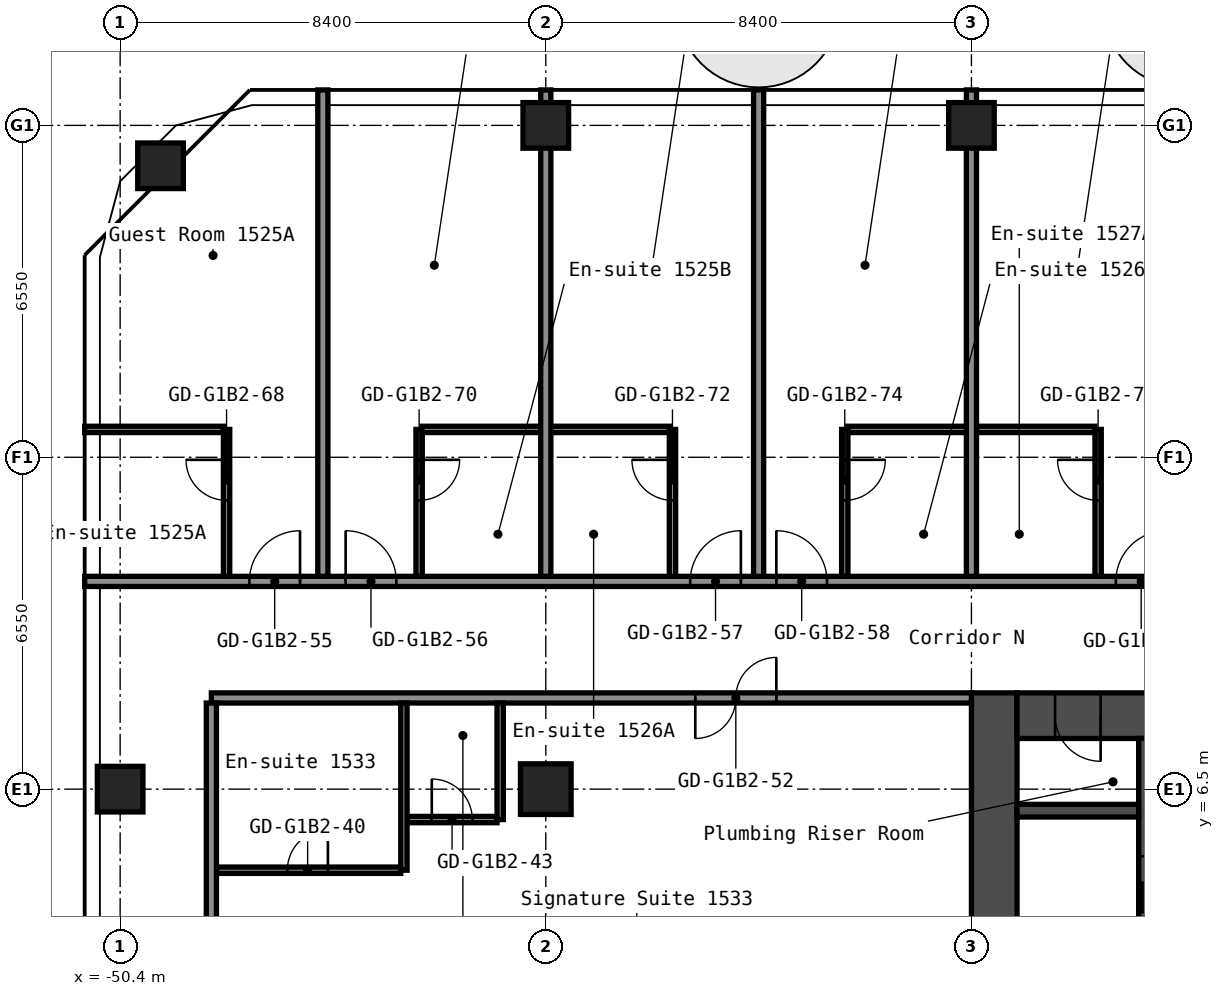
"""IFC4 building model, lengths in metres.
Left out: names, types, materials, properties, quantities, classifications, styles, units other than length and angle.
Written with IfcOpenShell. Run it as: python <this file> out.ifc"""

import sys

from ifc_helpers import new_model, si_unit, direction, frame, frame_2d, origin, origin_2d, place, context, subcontext, project, spatial, rectangle, hollow_rectangle, extrude, element, fill, save


model = new_model("IFC4")
c1 = context("Model", 3, precision=1e-05, world=origin(), true_north=direction((0.0, 1.0)))
c2 = subcontext(c1, "Body", "Model", "MODEL_VIEW")
j1 = project(units=[si_unit("LENGTHUNIT", "METRE"), si_unit("PLANEANGLEUNIT", "RADIAN")], contexts=[c1])
p1 = place(None, origin())
s1 = spatial("IfcSite", under=j1, at=p1, CompositionType="ELEMENT")
p2 = place(p1, origin())
s2 = spatial("IfcBuilding", under=s1, at=p2, CompositionType="ELEMENT")
p3 = place(p2, frame((0.0, 0.0, 55.0)))
s3 = spatial("IfcBuildingStorey", under=s2, at=p3, CompositionType="ELEMENT", Elevation=55.0)
for number, where, z_axis, x_axis in (
    (1, (-50.4, 6.5, 0.0), (0.0, 0.0, 1.0), (1.0, 0.0, 0.0)),
    (2, (-49.603, 18.803, 0.0), (0.0, 0.0, 1.0), (1.0, 0.0, 0.0)),
):
    element("IfcColumn", number, at=place(p3, frame(where, z_axis=z_axis, x_axis=x_axis)), inside=s3, PredefinedType="COLUMN", context=c2, shape_type="SweptSolid", body=[
        extrude(hollow_rectangle(XDim=0.9, YDim=0.9, WallThickness=0.036, at=origin_2d()), origin(), (0.0, 0.0, 1.0), 2.8),
    ])
p4 = place(p3, frame((-42.0, 6.5, 0.0), z_axis=(0.0, 0.0, 1.0), x_axis=(1.0, 0.0, 0.0)))
e3 = element("IfcColumn", 3, at=p4, inside=s3, PredefinedType="COLUMN", context=c2, shape_type="SweptSolid", body=[
    extrude(hollow_rectangle(XDim=1.0, YDim=1.0, WallThickness=0.04, at=origin_2d()), origin(), (0.0, 0.0, 1.0), 2.8),
])
for number, where, z_axis, x_axis in (
    (4, (-42.0, 19.6, 0.0), (0.0, 0.0, 1.0), (1.0, 0.0, 0.0)),
    (5, (-33.6, 19.6, 0.0), (0.0, 0.0, 1.0), (1.0, 0.0, 0.0)),
):
    element("IfcColumn", number, at=place(p3, frame(where, z_axis=z_axis, x_axis=x_axis)), inside=s3, PredefinedType="COLUMN", context=c2, shape_type="SweptSolid", body=[
        extrude(hollow_rectangle(XDim=0.9, YDim=0.9, WallThickness=0.036, at=origin_2d()), origin(), (0.0, 0.0, 1.0), 2.8),
    ])
p5 = place(p3, frame((-33.15, -8.4, 0.0), z_axis=(0.0, 0.0, 1.0), x_axis=(0.0, 1.0, 0.0)))
e6 = element("IfcWall", 6, at=p5, inside=s3, PredefinedType="SHEAR", context=c2, shape_type="SweptSolid", body=[
    extrude(rectangle(XDim=16.8, YDim=0.9, at=frame_2d((8.4, 0.0))), origin(), (0.0, 0.0, 1.0), 2.8),
])
p6 = place(p3, frame((-32.7, 7.95, 0.0), z_axis=(0.0, 0.0, 1.0), x_axis=(1.0, 0.0, 0.0)))
e7 = element("IfcWall", 7, at=p6, inside=s3, PredefinedType="SHEAR", context=c2, shape_type="SweptSolid", body=[
    extrude(rectangle(XDim=15.0, YDim=0.9, at=frame_2d((7.5, 0.0))), origin(), (0.0, 0.0, 1.0), 2.8),
])
p7 = place(p6, frame((3.4, 0.0, 0.0)))
e8 = element("IfcOpeningElement", 8, at=p7, cuts=e7, PredefinedType="OPENING", context=c2, shape_type="SweptSolid", body=[
    extrude(rectangle(XDim=1.2, YDim=2.1, at=frame_2d((0.6, 1.05))), frame((0.0, 0.46, 0.0), z_axis=(0.0, -1.0, 0.0), x_axis=(1.0, 0.0, 0.0)), (0.0, 0.0, 1.0), 0.92),
])
p8 = place(p6, frame((0.75, 0.0, 0.0)))
e9 = element("IfcOpeningElement", 9, at=p8, cuts=e7, PredefinedType="OPENING", context=c2, shape_type="SweptSolid", body=[
    extrude(rectangle(XDim=0.9, YDim=2.1, at=frame_2d((0.45, 1.05))), frame((0.0, 0.46, 0.0), z_axis=(0.0, -1.0, 0.0), x_axis=(1.0, 0.0, 0.0)), (0.0, 0.0, 1.0), 0.92),
])
p9 = place(p3, frame((-30.175, 1.45, 0.0), z_axis=(0.0, 0.0, 1.0), x_axis=(0.0, 1.0, 0.0)))
e10 = element("IfcWall", 10, at=p9, inside=s3, PredefinedType="SHEAR", context=c2, shape_type="SweptSolid", body=[
    extrude(rectangle(XDim=6.05, YDim=0.25, at=frame_2d((3.025, 0.0))), origin(), (0.0, 0.0, 1.0), 2.8),
])
p10 = place(p9, frame((2.625, 0.0, 0.0)))
e11 = element("IfcOpeningElement", 11, at=p10, cuts=e10, PredefinedType="OPENING", context=c2, shape_type="SweptSolid", body=[
    extrude(rectangle(XDim=1.1, YDim=2.1, at=frame_2d((0.55, 1.05))), frame((0.0, 0.135, 0.0), z_axis=(0.0, -1.0, 0.0), x_axis=(1.0, 0.0, 0.0)), (0.0, 0.0, 1.0), 0.27),
])
p11 = place(p3, frame((-32.7, 6.075, 0.0), z_axis=(0.0, 0.0, 1.0), x_axis=(1.0, 0.0, 0.0)))
e12 = element("IfcWall", 12, at=p11, inside=s3, PredefinedType="SHEAR", context=c2, shape_type="SweptSolid", body=[
    extrude(rectangle(XDim=2.4, YDim=0.25, at=frame_2d((1.2, 0.0))), origin(), (0.0, 0.0, 1.0), 2.8),
])
p12 = place(p3, frame((-48.5, 4.9, 0.0), z_axis=(0.0, 0.0, 1.0), x_axis=(1.0, 0.0, 0.0)))
e13 = element("IfcWall", 13, at=p12, inside=s3, PredefinedType="PARTITIONING", context=c2, shape_type="SweptSolid", body=[
    extrude(rectangle(XDim=3.637, YDim=0.125, at=frame_2d((1.819, 0.0))), origin(), (0.0, 0.0, 1.0), 2.8),
])
p13 = place(p12, frame((1.4, 0.0, 0.0)))
e14 = element("IfcOpeningElement", 14, at=p13, cuts=e13, PredefinedType="OPENING", context=c2, shape_type="SweptSolid", body=[
    extrude(rectangle(XDim=0.8, YDim=2.1, at=frame_2d((0.4, 1.05))), frame((0.0, 0.073, 0.0), z_axis=(0.0, -1.0, 0.0), x_axis=(1.0, 0.0, 0.0)), (0.0, 0.0, 1.0), 0.145),
])
p14 = place(p3, frame((-44.738, 5.9, 0.0), z_axis=(0.0, 0.0, 1.0), x_axis=(1.0, 0.0, 0.0)))
e15 = element("IfcWall", 15, at=p14, inside=s3, PredefinedType="PARTITIONING", context=c2, shape_type="SweptSolid", body=[
    extrude(rectangle(XDim=1.775, YDim=0.125, at=frame_2d((0.888, 0.0))), origin(), (0.0, 0.0, 1.0), 2.8),
])
p15 = place(p14, frame((0.488, 0.0, 0.0)))
e16 = element("IfcOpeningElement", 16, at=p15, cuts=e15, PredefinedType="OPENING", context=c2, shape_type="SweptSolid", body=[
    extrude(rectangle(XDim=0.8, YDim=2.1, at=frame_2d((0.4, 1.05))), frame((0.0, 0.073, 0.0), z_axis=(0.0, -1.0, 0.0), x_axis=(1.0, 0.0, 0.0)), (0.0, 0.0, 1.0), 0.145),
])
p16 = place(p3, frame((-48.6, 8.3, 0.0), z_axis=(0.0, 0.0, 1.0), x_axis=(1.0, 0.0, 0.0)))
e17 = element("IfcWall", 17, at=p16, inside=s3, PredefinedType="PARTITIONING", context=c2, shape_type="SweptSolid", body=[
    extrude(rectangle(XDim=15.0, YDim=0.2, at=frame_2d((7.5, 0.0))), origin(), (0.0, 0.0, 1.0), 2.8),
])
p17 = place(p16, frame((9.55, 0.0, 0.0)))
e18 = element("IfcOpeningElement", 18, at=p17, cuts=e17, PredefinedType="OPENING", context=c2, shape_type="SweptSolid", body=[
    extrude(rectangle(XDim=1.6, YDim=2.1, at=frame_2d((0.8, 1.05))), frame((0.0, 0.11, 0.0), z_axis=(0.0, -1.0, 0.0), x_axis=(1.0, 0.0, 0.0)), (0.0, 0.0, 1.0), 0.22),
])
p18 = place(p3, frame((-51.1, 10.6, 0.0), z_axis=(0.0, 0.0, 1.0), x_axis=(1.0, 0.0, 0.0)))
e19 = element("IfcWall", 19, at=p18, inside=s3, PredefinedType="PARTITIONING", context=c2, shape_type="SweptSolid", body=[
    extrude(rectangle(XDim=34.3, YDim=0.2, at=frame_2d((17.15, 0.0))), origin(), (0.0, 0.0, 1.0), 2.8),
])
p19 = place(p18, frame((3.25, 0.0, 0.0)))
e20 = element("IfcOpeningElement", 20, at=p19, cuts=e19, PredefinedType="OPENING", context=c2, shape_type="SweptSolid", body=[
    extrude(rectangle(XDim=1.0, YDim=2.1, at=frame_2d((0.5, 1.05))), frame((0.0, 0.11, 0.0), z_axis=(0.0, -1.0, 0.0), x_axis=(1.0, 0.0, 0.0)), (0.0, 0.0, 1.0), 0.22),
])
p20 = place(p18, frame((5.15, 0.0, 0.0)))
e21 = element("IfcOpeningElement", 21, at=p20, cuts=e19, PredefinedType="OPENING", context=c2, shape_type="SweptSolid", body=[
    extrude(rectangle(XDim=1.0, YDim=2.1, at=frame_2d((0.5, 1.05))), frame((0.0, 0.11, 0.0), z_axis=(0.0, -1.0, 0.0), x_axis=(1.0, 0.0, 0.0)), (0.0, 0.0, 1.0), 0.22),
])
p21 = place(p18, frame((11.95, 0.0, 0.0)))
e22 = element("IfcOpeningElement", 22, at=p21, cuts=e19, PredefinedType="OPENING", context=c2, shape_type="SweptSolid", body=[
    extrude(rectangle(XDim=1.0, YDim=2.1, at=frame_2d((0.5, 1.05))), frame((0.0, 0.11, 0.0), z_axis=(0.0, -1.0, 0.0), x_axis=(1.0, 0.0, 0.0)), (0.0, 0.0, 1.0), 0.22),
])
p22 = place(p18, frame((13.65, 0.0, 0.0)))
e23 = element("IfcOpeningElement", 23, at=p22, cuts=e19, PredefinedType="OPENING", context=c2, shape_type="SweptSolid", body=[
    extrude(rectangle(XDim=1.0, YDim=2.1, at=frame_2d((0.5, 1.05))), frame((0.0, 0.11, 0.0), z_axis=(0.0, -1.0, 0.0), x_axis=(1.0, 0.0, 0.0)), (0.0, 0.0, 1.0), 0.22),
])
p23 = place(p18, frame((20.35, 0.0, 0.0)))
e24 = element("IfcOpeningElement", 24, at=p23, cuts=e19, PredefinedType="OPENING", context=c2, shape_type="SweptSolid", body=[
    extrude(rectangle(XDim=1.0, YDim=2.1, at=frame_2d((0.5, 1.05))), frame((0.0, 0.11, 0.0), z_axis=(0.0, -1.0, 0.0), x_axis=(1.0, 0.0, 0.0)), (0.0, 0.0, 1.0), 0.22),
])
p24 = place(p18, frame((22.05, 0.0, 0.0)))
e25 = element("IfcOpeningElement", 25, at=p24, cuts=e19, PredefinedType="OPENING", context=c2, shape_type="SweptSolid", body=[
    extrude(rectangle(XDim=1.0, YDim=2.1, at=frame_2d((0.5, 1.05))), frame((0.0, 0.11, 0.0), z_axis=(0.0, -1.0, 0.0), x_axis=(1.0, 0.0, 0.0)), (0.0, 0.0, 1.0), 0.22),
])
p25 = place(p18, frame((28.75, 0.0, 0.0)))
e26 = element("IfcOpeningElement", 26, at=p25, cuts=e19, PredefinedType="OPENING", context=c2, shape_type="SweptSolid", body=[
    extrude(rectangle(XDim=1.0, YDim=2.1, at=frame_2d((0.5, 1.05))), frame((0.0, 0.11, 0.0), z_axis=(0.0, -1.0, 0.0), x_axis=(1.0, 0.0, 0.0)), (0.0, 0.0, 1.0), 0.22),
])
p26 = place(p18, frame((30.45, 0.0, 0.0)))
e27 = element("IfcOpeningElement", 27, at=p26, cuts=e19, PredefinedType="OPENING", context=c2, shape_type="SweptSolid", body=[
    extrude(rectangle(XDim=1.0, YDim=2.1, at=frame_2d((0.5, 1.05))), frame((0.0, 0.11, 0.0), z_axis=(0.0, -1.0, 0.0), x_axis=(1.0, 0.0, 0.0)), (0.0, 0.0, 1.0), 0.22),
])
p27 = place(p3, frame((-51.1, 13.6, 0.0), z_axis=(0.0, 0.0, 1.0), x_axis=(1.0, 0.0, 0.0)))
e28 = element("IfcWall", 28, at=p27, inside=s3, PredefinedType="PARTITIONING", context=c2, shape_type="SweptSolid", body=[
    extrude(rectangle(XDim=2.738, YDim=0.125, at=frame_2d((1.369, 0.0))), origin(), (0.0, 0.0, 1.0), 2.8),
])
for number, where, z_axis, x_axis in (
    (29, (-44.438, 13.6, 0.0), (0.0, 0.0, 1.0), (1.0, 0.0, 0.0)),
    (30, (-36.038, 13.6, 0.0), (0.0, 0.0, 1.0), (1.0, 0.0, 0.0)),
):
    element("IfcWall", number, at=place(p3, frame(where, z_axis=z_axis, x_axis=x_axis)), inside=s3, PredefinedType="PARTITIONING", context=c2, shape_type="SweptSolid", body=[
        extrude(rectangle(XDim=4.875, YDim=0.125, at=frame_2d((2.438, 0.0))), origin(), (0.0, 0.0, 1.0), 2.8),
    ])
p28 = place(p3, frame((-48.6, -8.2, 0.0), z_axis=(0.0, 0.0, 1.0), x_axis=(0.0, 1.0, 0.0)))
e31 = element("IfcWall", 31, at=p28, inside=s3, PredefinedType="PARTITIONING", context=c2, shape_type="SweptSolid", body=[
    extrude(rectangle(XDim=16.4, YDim=0.2, at=frame_2d((8.2, 0.0))), origin(), (0.0, 0.0, 1.0), 2.8),
])
p29 = place(p3, frame((-48.3, 10.7, 0.0), z_axis=(0.0, 0.0, 1.0), x_axis=(0.0, 1.0, 0.0)))
e32 = element("IfcWall", 32, at=p29, inside=s3, PredefinedType="PARTITIONING", context=c2, shape_type="SweptSolid", body=[
    extrude(rectangle(XDim=2.9, YDim=0.125, at=frame_2d((1.45, 0.0))), origin(), (0.0, 0.0, 1.0), 2.8),
])
p30 = place(p29, frame((1.5, 0.0, 0.0)))
e33 = element("IfcOpeningElement", 33, at=p30, cuts=e32, PredefinedType="OPENING", context=c2, shape_type="SweptSolid", body=[
    extrude(rectangle(XDim=0.8, YDim=2.1, at=frame_2d((0.4, 1.05))), frame((0.0, 0.073, 0.0), z_axis=(0.0, -1.0, 0.0), x_axis=(1.0, 0.0, 0.0)), (0.0, 0.0, 1.0), 0.145),
])
p31 = place(p3, frame((-46.4, 10.7, 0.0), z_axis=(0.0, 0.0, 1.0), x_axis=(0.0, 1.0, 0.0)))
e34 = element("IfcWall", 34, at=p31, inside=s3, PredefinedType="PARTITIONING", context=c2, shape_type="SweptSolid", body=[
    extrude(rectangle(XDim=9.6, YDim=0.2, at=frame_2d((4.8, 0.0))), origin(), (0.0, 0.0, 1.0), 2.8),
])
p32 = place(p3, frame((-44.8, 4.9, 0.0), z_axis=(0.0, 0.0, 1.0), x_axis=(0.0, 1.0, 0.0)))
e35 = element("IfcWall", 35, at=p32, inside=s3, PredefinedType="PARTITIONING", context=c2, shape_type="SweptSolid", body=[
    extrude(rectangle(XDim=3.3, YDim=0.125, at=frame_2d((1.65, 0.0))), origin(), (0.0, 0.0, 1.0), 2.8),
])
p33 = place(p3, frame((-44.5, 10.7, 0.0), z_axis=(0.0, 0.0, 1.0), x_axis=(0.0, 1.0, 0.0)))
e36 = element("IfcWall", 36, at=p33, inside=s3, PredefinedType="PARTITIONING", context=c2, shape_type="SweptSolid", body=[
    extrude(rectangle(XDim=2.9, YDim=0.125, at=frame_2d((1.45, 0.0))), origin(), (0.0, 0.0, 1.0), 2.8),
])
p34 = place(p33, frame((1.5, 0.0, 0.0)))
e37 = element("IfcOpeningElement", 37, at=p34, cuts=e36, PredefinedType="OPENING", context=c2, shape_type="SweptSolid", body=[
    extrude(rectangle(XDim=0.8, YDim=2.1, at=frame_2d((0.4, 1.05))), frame((0.0, 0.073, 0.0), z_axis=(0.0, -1.0, 0.0), x_axis=(1.0, 0.0, 0.0)), (0.0, 0.0, 1.0), 0.145),
])
p35 = place(p3, frame((-42.9, 5.9, 0.0), z_axis=(0.0, 0.0, 1.0), x_axis=(0.0, 1.0, 0.0)))
e38 = element("IfcWall", 38, at=p35, inside=s3, PredefinedType="PARTITIONING", context=c2, shape_type="SweptSolid", body=[
    extrude(rectangle(XDim=2.3, YDim=0.125, at=frame_2d((1.15, 0.0))), origin(), (0.0, 0.0, 1.0), 2.8),
])
p36 = place(p3, frame((-42.0, 10.7, 0.0), z_axis=(0.0, 0.0, 1.0), x_axis=(0.0, 1.0, 0.0)))
e39 = element("IfcWall", 39, at=p36, inside=s3, PredefinedType="PARTITIONING", context=c2, shape_type="SweptSolid", body=[
    extrude(rectangle(XDim=9.6, YDim=0.2, at=frame_2d((4.8, 0.0))), origin(), (0.0, 0.0, 1.0), 2.8),
])
p37 = place(p3, frame((-39.5, 10.7, 0.0), z_axis=(0.0, 0.0, 1.0), x_axis=(0.0, 1.0, 0.0)))
e40 = element("IfcWall", 40, at=p37, inside=s3, PredefinedType="PARTITIONING", context=c2, shape_type="SweptSolid", body=[
    extrude(rectangle(XDim=2.9, YDim=0.125, at=frame_2d((1.45, 0.0))), origin(), (0.0, 0.0, 1.0), 2.8),
])
p38 = place(p37, frame((1.5, 0.0, 0.0)))
e41 = element("IfcOpeningElement", 41, at=p38, cuts=e40, PredefinedType="OPENING", context=c2, shape_type="SweptSolid", body=[
    extrude(rectangle(XDim=0.8, YDim=2.1, at=frame_2d((0.4, 1.05))), frame((0.0, 0.073, 0.0), z_axis=(0.0, -1.0, 0.0), x_axis=(1.0, 0.0, 0.0)), (0.0, 0.0, 1.0), 0.145),
])
p39 = place(p3, frame((-37.8, 10.7, 0.0), z_axis=(0.0, 0.0, 1.0), x_axis=(0.0, 1.0, 0.0)))
e42 = element("IfcWall", 42, at=p39, inside=s3, PredefinedType="PARTITIONING", context=c2, shape_type="SweptSolid", body=[
    extrude(rectangle(XDim=9.6, YDim=0.2, at=frame_2d((4.8, 0.0))), origin(), (0.0, 0.0, 1.0), 2.8),
])
p40 = place(p3, frame((-36.1, 10.7, 0.0), z_axis=(0.0, 0.0, 1.0), x_axis=(0.0, 1.0, 0.0)))
e43 = element("IfcWall", 43, at=p40, inside=s3, PredefinedType="PARTITIONING", context=c2, shape_type="SweptSolid", body=[
    extrude(rectangle(XDim=2.9, YDim=0.125, at=frame_2d((1.45, 0.0))), origin(), (0.0, 0.0, 1.0), 2.8),
])
p41 = place(p40, frame((1.5, 0.0, 0.0)))
e44 = element("IfcOpeningElement", 44, at=p41, cuts=e43, PredefinedType="OPENING", context=c2, shape_type="SweptSolid", body=[
    extrude(rectangle(XDim=0.8, YDim=2.1, at=frame_2d((0.4, 1.05))), frame((0.0, 0.073, 0.0), z_axis=(0.0, -1.0, 0.0), x_axis=(1.0, 0.0, 0.0)), (0.0, 0.0, 1.0), 0.145),
])
p42 = place(p3, frame((-33.6, 10.7, 0.0), z_axis=(0.0, 0.0, 1.0), x_axis=(0.0, 1.0, 0.0)))
e45 = element("IfcWall", 45, at=p42, inside=s3, PredefinedType="PARTITIONING", context=c2, shape_type="SweptSolid", body=[
    extrude(rectangle(XDim=9.6, YDim=0.2, at=frame_2d((4.8, 0.0))), origin(), (0.0, 0.0, 1.0), 2.8),
])
p43 = place(p3, frame((-31.1, 10.7, 0.0), z_axis=(0.0, 0.0, 1.0), x_axis=(0.0, 1.0, 0.0)))
e46 = element("IfcWall", 46, at=p43, inside=s3, PredefinedType="PARTITIONING", context=c2, shape_type="SweptSolid", body=[
    extrude(rectangle(XDim=2.9, YDim=0.125, at=frame_2d((1.45, 0.0))), origin(), (0.0, 0.0, 1.0), 2.8),
])
p44 = place(p43, frame((1.5, 0.0, 0.0)))
e47 = element("IfcOpeningElement", 47, at=p44, cuts=e46, PredefinedType="OPENING", context=c2, shape_type="SweptSolid", body=[
    extrude(rectangle(XDim=0.8, YDim=2.1, at=frame_2d((0.4, 1.05))), frame((0.0, 0.073, 0.0), z_axis=(0.0, -1.0, 0.0), x_axis=(1.0, 0.0, 0.0)), (0.0, 0.0, 1.0), 0.145),
])
p45 = place(p8, origin())
e48 = element("IfcDoor", 48, at=p45, inside=s3, OperationType="SINGLE_SWING_RIGHT", PredefinedType="DOOR", context=c2, shape_type="SweptSolid", body=[
    extrude(rectangle(XDim=0.9, YDim=2.1, at=frame_2d((0.45, 1.05))), frame((0.0, 0.025, 0.0), z_axis=(0.0, -1.0, 0.0), x_axis=(1.0, 0.0, 0.0)), (0.0, 0.0, 1.0), 0.05),
])
fill(e9, e48)
p46 = place(p13, origin())
e49 = element("IfcDoor", 49, at=p46, inside=s3, OperationType="SINGLE_SWING_LEFT", PredefinedType="DOOR", context=c2, shape_type="SweptSolid", body=[
    extrude(rectangle(XDim=0.8, YDim=2.1, at=frame_2d((0.4, 1.05))), frame((0.0, 0.025, 0.0), z_axis=(0.0, -1.0, 0.0), x_axis=(1.0, 0.0, 0.0)), (0.0, 0.0, 1.0), 0.05),
])
fill(e14, e49)
p47 = place(p15, origin())
e50 = element("IfcDoor", 50, at=p47, inside=s3, OperationType="SINGLE_SWING_RIGHT", PredefinedType="DOOR", context=c2, shape_type="SweptSolid", body=[
    extrude(rectangle(XDim=0.8, YDim=2.1, at=frame_2d((0.4, 1.05))), frame((0.0, 0.025, 0.0), z_axis=(0.0, -1.0, 0.0), x_axis=(1.0, 0.0, 0.0)), (0.0, 0.0, 1.0), 0.05),
])
fill(e16, e50)
p48 = place(p17, origin())
e51 = element("IfcDoor", 51, at=p48, inside=s3, OperationType="DOUBLE_DOOR_SINGLE_SWING", PredefinedType="DOOR", context=c2, shape_type="SweptSolid", body=[
    extrude(rectangle(XDim=1.6, YDim=2.1, at=frame_2d((0.8, 1.05))), frame((0.0, 0.025, 0.0), z_axis=(0.0, -1.0, 0.0), x_axis=(1.0, 0.0, 0.0)), (0.0, 0.0, 1.0), 0.05),
])
fill(e18, e51)
p49 = place(p19, origin())
e52 = element("IfcDoor", 52, at=p49, inside=s3, OperationType="SINGLE_SWING_LEFT", PredefinedType="DOOR", context=c2, shape_type="SweptSolid", body=[
    extrude(rectangle(XDim=1.0, YDim=2.1, at=frame_2d((0.5, 1.05))), frame((0.0, 0.025, 0.0), z_axis=(0.0, -1.0, 0.0), x_axis=(1.0, 0.0, 0.0)), (0.0, 0.0, 1.0), 0.05),
])
fill(e20, e52)
p50 = place(p20, origin())
e53 = element("IfcDoor", 53, at=p50, inside=s3, OperationType="SINGLE_SWING_RIGHT", PredefinedType="DOOR", context=c2, shape_type="SweptSolid", body=[
    extrude(rectangle(XDim=1.0, YDim=2.1, at=frame_2d((0.5, 1.05))), frame((0.0, 0.025, 0.0), z_axis=(0.0, -1.0, 0.0), x_axis=(1.0, 0.0, 0.0)), (0.0, 0.0, 1.0), 0.05),
])
fill(e21, e53)
p51 = place(p21, origin())
e54 = element("IfcDoor", 54, at=p51, inside=s3, OperationType="SINGLE_SWING_LEFT", PredefinedType="DOOR", context=c2, shape_type="SweptSolid", body=[
    extrude(rectangle(XDim=1.0, YDim=2.1, at=frame_2d((0.5, 1.05))), frame((0.0, 0.025, 0.0), z_axis=(0.0, -1.0, 0.0), x_axis=(1.0, 0.0, 0.0)), (0.0, 0.0, 1.0), 0.05),
])
fill(e22, e54)
p52 = place(p22, origin())
e55 = element("IfcDoor", 55, at=p52, inside=s3, OperationType="SINGLE_SWING_RIGHT", PredefinedType="DOOR", context=c2, shape_type="SweptSolid", body=[
    extrude(rectangle(XDim=1.0, YDim=2.1, at=frame_2d((0.5, 1.05))), frame((0.0, 0.025, 0.0), z_axis=(0.0, -1.0, 0.0), x_axis=(1.0, 0.0, 0.0)), (0.0, 0.0, 1.0), 0.05),
])
fill(e23, e55)
p53 = place(p23, origin())
e56 = element("IfcDoor", 56, at=p53, inside=s3, OperationType="SINGLE_SWING_LEFT", PredefinedType="DOOR", context=c2, shape_type="SweptSolid", body=[
    extrude(rectangle(XDim=1.0, YDim=2.1, at=frame_2d((0.5, 1.05))), frame((0.0, 0.025, 0.0), z_axis=(0.0, -1.0, 0.0), x_axis=(1.0, 0.0, 0.0)), (0.0, 0.0, 1.0), 0.05),
])
fill(e24, e56)
p54 = place(p30, origin())
e57 = element("IfcDoor", 57, at=p54, inside=s3, OperationType="SINGLE_SWING_LEFT", PredefinedType="DOOR", context=c2, shape_type="SweptSolid", body=[
    extrude(rectangle(XDim=0.8, YDim=2.1, at=frame_2d((0.4, 1.05))), frame((0.0, 0.025, 0.0), z_axis=(0.0, -1.0, 0.0), x_axis=(1.0, 0.0, 0.0)), (0.0, 0.0, 1.0), 0.05),
])
fill(e33, e57)
p55 = place(p34, origin())
e58 = element("IfcDoor", 58, at=p55, inside=s3, OperationType="SINGLE_SWING_RIGHT", PredefinedType="DOOR", context=c2, shape_type="SweptSolid", body=[
    extrude(rectangle(XDim=0.8, YDim=2.1, at=frame_2d((0.4, 1.05))), frame((0.0, 0.025, 0.0), z_axis=(0.0, -1.0, 0.0), x_axis=(1.0, 0.0, 0.0)), (0.0, 0.0, 1.0), 0.05),
])
fill(e37, e58)
p56 = place(p38, origin())
e59 = element("IfcDoor", 59, at=p56, inside=s3, OperationType="SINGLE_SWING_LEFT", PredefinedType="DOOR", context=c2, shape_type="SweptSolid", body=[
    extrude(rectangle(XDim=0.8, YDim=2.1, at=frame_2d((0.4, 1.05))), frame((0.0, 0.025, 0.0), z_axis=(0.0, -1.0, 0.0), x_axis=(1.0, 0.0, 0.0)), (0.0, 0.0, 1.0), 0.05),
])
fill(e41, e59)
p57 = place(p41, origin())
e60 = element("IfcDoor", 60, at=p57, inside=s3, OperationType="SINGLE_SWING_RIGHT", PredefinedType="DOOR", context=c2, shape_type="SweptSolid", body=[
    extrude(rectangle(XDim=0.8, YDim=2.1, at=frame_2d((0.4, 1.05))), frame((0.0, 0.025, 0.0), z_axis=(0.0, -1.0, 0.0), x_axis=(1.0, 0.0, 0.0)), (0.0, 0.0, 1.0), 0.05),
])
fill(e44, e60)
p58 = place(p44, origin())
e61 = element("IfcDoor", 61, at=p58, inside=s3, OperationType="SINGLE_SWING_LEFT", PredefinedType="DOOR", context=c2, shape_type="SweptSolid", body=[
    extrude(rectangle(XDim=0.8, YDim=2.1, at=frame_2d((0.4, 1.05))), frame((0.0, 0.025, 0.0), z_axis=(0.0, -1.0, 0.0), x_axis=(1.0, 0.0, 0.0)), (0.0, 0.0, 1.0), 0.05),
])
fill(e47, e61)
save(model, sys.argv[1])
